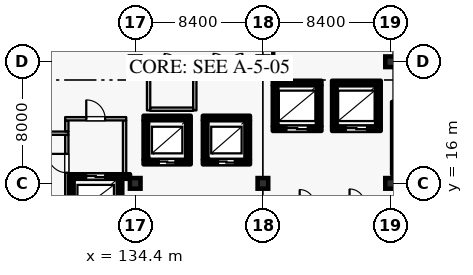
"""IFC4 building model, lengths in metres.
Left out: names, types, materials, properties, quantities, classifications, styles, units other than length and angle.
Written with IfcOpenShell. Run it as: python <this file> out.ifc"""

import sys

from ifc_helpers import new_model, si_unit, direction, frame, frame_2d, origin, origin_2d, place, context, subcontext, project, spatial, rectangle, extrude, element, fill, save


model = new_model("IFC4")
c1 = context("Model", 3, precision=1e-05, world=origin(), true_north=direction((0.0, 1.0)))
c2 = subcontext(c1, "Body", "Model", "MODEL_VIEW")
j1 = project(units=[si_unit("LENGTHUNIT", "METRE"), si_unit("PLANEANGLEUNIT", "RADIAN")], contexts=[c1])
p1 = place(None, origin())
s1 = spatial("IfcSite", under=j1, at=p1, CompositionType="ELEMENT")
p2 = place(p1, origin())
s2 = spatial("IfcBuilding", under=s1, at=p2, CompositionType="ELEMENT")
p3 = place(p2, frame((0.0, 0.0, 28.8)))
s3 = spatial("IfcBuildingStorey", under=s2, at=p3, CompositionType="ELEMENT", Elevation=28.8)
for number, where, z_axis, x_axis in (
    (1, (134.4, 16.0, 0.0), (0.0, 0.0, 1.0), (1.0, 0.0, 0.0)),
    (2, (142.8, 16.0, 0.0), (0.0, 0.0, 1.0), (1.0, 0.0, 0.0)),
    (3, (151.2, 24.0, 0.0), (0.0, 0.0, 1.0), (1.0, 0.0, 0.0)),
    (4, (134.4, 24.0, 0.0), (0.0, 0.0, 1.0), (1.0, 0.0, 0.0)),
    (5, (142.8, 24.0, 0.0), (0.0, 0.0, 1.0), (1.0, 0.0, 0.0)),
    (6, (151.2, 16.0, 0.0), (0.0, 0.0, 1.0), (1.0, 0.0, 0.0)),
):
    element("IfcColumn", number, at=place(p3, frame(where, z_axis=z_axis, x_axis=x_axis)), inside=s3, PredefinedType="COLUMN", context=c2, shape_type="SweptSolid", body=[
        extrude(rectangle(XDim=0.7, YDim=0.7, at=origin_2d()), origin(), (0.0, 0.0, 1.0), 3.6),
    ])
p4 = place(p3, frame((134.95, 17.4, 0.0), z_axis=(0.0, 0.0, 1.0), x_axis=(1.0, 0.0, 0.0)))
e7 = element("IfcWall", 7, at=p4, inside=s3, PredefinedType="SHEAR", context=c2, shape_type="SweptSolid", body=[
    extrude(rectangle(XDim=3.1, YDim=0.3, at=frame_2d((1.55, 0.0))), origin(), (0.0, 0.0, 1.0), 3.365),
])
p5 = place(p4, frame((1.0, 0.0, 0.0)))
e8 = element("IfcOpeningElement", 8, at=p5, cuts=e7, PredefinedType="OPENING", context=c2, shape_type="SweptSolid", body=[
    extrude(rectangle(XDim=1.1, YDim=2.2, at=frame_2d((0.55, 1.1))), frame((0.0, 0.16, 0.0), z_axis=(0.0, -1.0, 0.0), x_axis=(1.0, 0.0, 0.0)), (0.0, 0.0, 1.0), 0.32),
])
p6 = place(p3, frame((137.9, 17.555, 0.0), z_axis=(0.0, 0.0, 1.0), x_axis=(0.0, 1.0, 0.0)))
e9 = element("IfcWall", 9, at=p6, inside=s3, PredefinedType="SHEAR", context=c2, shape_type="SweptSolid", body=[
    extrude(rectangle(XDim=2.59, YDim=0.3, at=frame_2d((1.295, 0.0))), origin(), (0.0, 0.0, 1.0), 3.365),
])
p7 = place(p3, frame((138.05, 20.3, 0.0), z_axis=(0.0, 0.0, 1.0), x_axis=(-1.0, 0.0, 0.0)))
e10 = element("IfcWall", 10, at=p7, inside=s3, PredefinedType="SHEAR", context=c2, shape_type="SweptSolid", body=[
    extrude(rectangle(XDim=3.1, YDim=0.3, at=frame_2d((1.55, 0.0))), origin(), (0.0, 0.0, 1.0), 3.365),
])
p8 = place(p3, frame((135.1, 20.145, 0.0), z_axis=(0.0, 0.0, 1.0), x_axis=(0.0, -1.0, 0.0)))
e11 = element("IfcWall", 11, at=p8, inside=s3, PredefinedType="SHEAR", context=c2, shape_type="SweptSolid", body=[
    extrude(rectangle(XDim=2.59, YDim=0.3, at=frame_2d((1.295, 0.0))), origin(), (0.0, 0.0, 1.0), 3.365),
])
p9 = place(p3, frame((138.85, 17.4, 0.0), z_axis=(0.0, 0.0, 1.0), x_axis=(1.0, 0.0, 0.0)))
e12 = element("IfcWall", 12, at=p9, inside=s3, PredefinedType="SHEAR", context=c2, shape_type="SweptSolid", body=[
    extrude(rectangle(XDim=3.1, YDim=0.3, at=frame_2d((1.55, 0.0))), origin(), (0.0, 0.0, 1.0), 3.365),
])
p10 = place(p9, frame((1.0, 0.0, 0.0)))
e13 = element("IfcOpeningElement", 13, at=p10, cuts=e12, PredefinedType="OPENING", context=c2, shape_type="SweptSolid", body=[
    extrude(rectangle(XDim=1.1, YDim=2.2, at=frame_2d((0.55, 1.1))), frame((0.0, 0.16, 0.0), z_axis=(0.0, -1.0, 0.0), x_axis=(1.0, 0.0, 0.0)), (0.0, 0.0, 1.0), 0.32),
])
p11 = place(p3, frame((141.8, 17.555, 0.0), z_axis=(0.0, 0.0, 1.0), x_axis=(0.0, 1.0, 0.0)))
e14 = element("IfcWall", 14, at=p11, inside=s3, PredefinedType="SHEAR", context=c2, shape_type="SweptSolid", body=[
    extrude(rectangle(XDim=2.59, YDim=0.3, at=frame_2d((1.295, 0.0))), origin(), (0.0, 0.0, 1.0), 3.365),
])
p12 = place(p3, frame((141.95, 20.3, 0.0), z_axis=(0.0, 0.0, 1.0), x_axis=(-1.0, 0.0, 0.0)))
e15 = element("IfcWall", 15, at=p12, inside=s3, PredefinedType="SHEAR", context=c2, shape_type="SweptSolid", body=[
    extrude(rectangle(XDim=3.1, YDim=0.3, at=frame_2d((1.55, 0.0))), origin(), (0.0, 0.0, 1.0), 3.365),
])
p13 = place(p3, frame((139.0, 20.145, 0.0), z_axis=(0.0, 0.0, 1.0), x_axis=(0.0, -1.0, 0.0)))
e16 = element("IfcWall", 16, at=p13, inside=s3, PredefinedType="SHEAR", context=c2, shape_type="SweptSolid", body=[
    extrude(rectangle(XDim=2.59, YDim=0.3, at=frame_2d((1.295, 0.0))), origin(), (0.0, 0.0, 1.0), 3.365),
])
p14 = place(p3, frame((133.4, 13.705, 0.0), z_axis=(0.0, 0.0, 1.0), x_axis=(0.0, 1.0, 0.0)))
e17 = element("IfcWall", 17, at=p14, inside=s3, PredefinedType="SHEAR", context=c2, shape_type="SweptSolid", body=[
    extrude(rectangle(XDim=2.59, YDim=0.3, at=frame_2d((1.295, 0.0))), origin(), (0.0, 0.0, 1.0), 3.365),
])
p15 = place(p3, frame((134.06, 16.45, 0.0), z_axis=(0.0, 0.0, 1.0), x_axis=(-1.0, 0.0, 0.0)))
e18 = element("IfcWall", 18, at=p15, inside=s3, PredefinedType="SHEAR", context=c2, shape_type="SweptSolid", body=[
    extrude(rectangle(XDim=4.01, YDim=0.3, at=frame_2d((2.005, 0.0))), origin(), (0.0, 0.0, 1.0), 3.365),
])
p16 = place(p15, frame((1.635, 0.0, 0.0)))
e19 = element("IfcOpeningElement", 19, at=p16, cuts=e18, PredefinedType="OPENING", context=c2, shape_type="SweptSolid", body=[
    extrude(rectangle(XDim=1.25, YDim=2.25, at=frame_2d((0.625, 1.125))), frame((0.0, 0.16, 0.0), z_axis=(0.0, -1.0, 0.0), x_axis=(1.0, 0.0, 0.0)), (0.0, 0.0, 1.0), 0.32),
])
p17 = place(p3, frame((130.2, 16.295, 0.0), z_axis=(0.0, 0.0, 1.0), x_axis=(0.0, -1.0, 0.0)))
e20 = element("IfcWall", 20, at=p17, inside=s3, PredefinedType="SHEAR", context=c2, shape_type="SweptSolid", body=[
    extrude(rectangle(XDim=2.59, YDim=0.3, at=frame_2d((1.295, 0.0))), origin(), (0.0, 0.0, 1.0), 3.365),
])
p18 = place(p3, frame((143.45, 19.6, 0.0), z_axis=(0.0, 0.0, 1.0), x_axis=(1.0, 0.0, 0.0)))
e21 = element("IfcWall", 21, at=p18, inside=s3, PredefinedType="SHEAR", context=c2, shape_type="SweptSolid", body=[
    extrude(rectangle(XDim=3.2, YDim=0.3, at=frame_2d((1.6, 0.0))), origin(), (0.0, 0.0, 1.0), 3.365),
])
p19 = place(p18, frame((0.9, 0.0, 0.0)))
e22 = element("IfcOpeningElement", 22, at=p19, cuts=e21, PredefinedType="OPENING", context=c2, shape_type="SweptSolid", body=[
    extrude(rectangle(XDim=1.4, YDim=2.35, at=frame_2d((0.7, 1.175))), frame((0.0, 0.16, 0.0), z_axis=(0.0, -1.0, 0.0), x_axis=(1.0, 0.0, 0.0)), (0.0, 0.0, 1.0), 0.32),
])
p20 = place(p3, frame((146.5, 19.755, 0.0), z_axis=(0.0, 0.0, 1.0), x_axis=(0.0, 1.0, 0.0)))
e23 = element("IfcWall", 23, at=p20, inside=s3, PredefinedType="SHEAR", context=c2, shape_type="SweptSolid", body=[
    extrude(rectangle(XDim=2.69, YDim=0.3, at=frame_2d((1.345, 0.0))), origin(), (0.0, 0.0, 1.0), 3.365),
])
p21 = place(p3, frame((146.65, 22.6, 0.0), z_axis=(0.0, 0.0, 1.0), x_axis=(-1.0, 0.0, 0.0)))
e24 = element("IfcWall", 24, at=p21, inside=s3, PredefinedType="SHEAR", context=c2, shape_type="SweptSolid", body=[
    extrude(rectangle(XDim=3.2, YDim=0.3, at=frame_2d((1.6, 0.0))), origin(), (0.0, 0.0, 1.0), 3.365),
])
p22 = place(p3, frame((143.6, 22.445, 0.0), z_axis=(0.0, 0.0, 1.0), x_axis=(0.0, -1.0, 0.0)))
e25 = element("IfcWall", 25, at=p22, inside=s3, PredefinedType="SHEAR", context=c2, shape_type="SweptSolid", body=[
    extrude(rectangle(XDim=2.69, YDim=0.3, at=frame_2d((1.345, 0.0))), origin(), (0.0, 0.0, 1.0), 3.365),
])
p23 = place(p3, frame((147.35, 19.6, 0.0), z_axis=(0.0, 0.0, 1.0), x_axis=(1.0, 0.0, 0.0)))
e26 = element("IfcWall", 26, at=p23, inside=s3, PredefinedType="SHEAR", context=c2, shape_type="SweptSolid", body=[
    extrude(rectangle(XDim=3.2, YDim=0.3, at=frame_2d((1.6, 0.0))), origin(), (0.0, 0.0, 1.0), 3.365),
])
p24 = place(p23, frame((0.9, 0.0, 0.0)))
e27 = element("IfcOpeningElement", 27, at=p24, cuts=e26, PredefinedType="OPENING", context=c2, shape_type="SweptSolid", body=[
    extrude(rectangle(XDim=1.4, YDim=2.35, at=frame_2d((0.7, 1.175))), frame((0.0, 0.16, 0.0), z_axis=(0.0, -1.0, 0.0), x_axis=(1.0, 0.0, 0.0)), (0.0, 0.0, 1.0), 0.32),
])
p25 = place(p3, frame((150.4, 19.755, 0.0), z_axis=(0.0, 0.0, 1.0), x_axis=(0.0, 1.0, 0.0)))
e28 = element("IfcWall", 28, at=p25, inside=s3, PredefinedType="SHEAR", context=c2, shape_type="SweptSolid", body=[
    extrude(rectangle(XDim=2.69, YDim=0.3, at=frame_2d((1.345, 0.0))), origin(), (0.0, 0.0, 1.0), 3.365),
])
p26 = place(p3, frame((150.55, 22.6, 0.0), z_axis=(0.0, 0.0, 1.0), x_axis=(-1.0, 0.0, 0.0)))
e29 = element("IfcWall", 29, at=p26, inside=s3, PredefinedType="SHEAR", context=c2, shape_type="SweptSolid", body=[
    extrude(rectangle(XDim=3.2, YDim=0.3, at=frame_2d((1.6, 0.0))), origin(), (0.0, 0.0, 1.0), 3.365),
])
p27 = place(p3, frame((147.5, 22.445, 0.0), z_axis=(0.0, 0.0, 1.0), x_axis=(0.0, -1.0, 0.0)))
e30 = element("IfcWall", 30, at=p27, inside=s3, PredefinedType="SHEAR", context=c2, shape_type="SweptSolid", body=[
    extrude(rectangle(XDim=2.69, YDim=0.3, at=frame_2d((1.345, 0.0))), origin(), (0.0, 0.0, 1.0), 3.365),
])
p28 = place(p3, frame((126.19, 19.3, 0.0), z_axis=(0.0, 0.0, 1.0), x_axis=(1.0, 0.0, 0.0)))
e31 = element("IfcWall", 31, at=p28, inside=s3, PredefinedType="PARTITIONING", context=c2, shape_type="SweptSolid", body=[
    extrude(rectangle(XDim=3.82, YDim=0.22, at=frame_2d((1.91, 0.0))), origin(), (0.0, 0.0, 1.0), 3.365),
])
p29 = place(p28, frame((1.35, 0.0, 0.0)))
e32 = element("IfcOpeningElement", 32, at=p29, cuts=e31, PredefinedType="OPENING", context=c2, shape_type="SweptSolid", body=[
    extrude(rectangle(XDim=1.12, YDim=2.2, at=frame_2d((0.56, 1.1))), frame((0.0, 0.12, 0.0), z_axis=(0.0, -1.0, 0.0), x_axis=(1.0, 0.0, 0.0)), (0.0, 0.0, 1.0), 0.24),
])
p30 = place(p3, frame((129.9, 13.365, 0.0), z_axis=(0.0, 0.0, 1.0), x_axis=(0.0, 1.0, 0.0)))
e33 = element("IfcWall", 33, at=p30, inside=s3, PredefinedType="PARTITIONING", context=c2, shape_type="SweptSolid", body=[
    extrude(rectangle(XDim=5.82, YDim=0.22, at=frame_2d((2.91, 0.0))), origin(), (0.0, 0.0, 1.0), 3.365),
])
p31 = place(p30, frame((3.335, 0.0, 0.0)))
e34 = element("IfcOpeningElement", 34, at=p31, cuts=e33, PredefinedType="OPENING", context=c2, shape_type="SweptSolid", body=[
    extrude(rectangle(XDim=1.24, YDim=2.2, at=frame_2d((0.62, 1.1))), frame((0.0, 0.12, 0.0), z_axis=(0.0, -1.0, 0.0), x_axis=(1.0, 0.0, 0.0)), (0.0, 0.0, 1.0), 0.24),
])
p32 = place(p3, frame((129.9, 19.415, 0.0), z_axis=(0.0, 0.0, 1.0), x_axis=(0.0, 1.0, 0.0)))
e35 = element("IfcWall", 35, at=p32, inside=s3, PredefinedType="PARTITIONING", context=c2, shape_type="SweptSolid", body=[
    extrude(rectangle(XDim=0.72, YDim=0.22, at=frame_2d((0.36, 0.0))), origin(), (0.0, 0.0, 1.0), 3.365),
])
p33 = place(p3, frame((133.7, 16.605, 0.0), z_axis=(0.0, 0.0, 1.0), x_axis=(0.0, 1.0, 0.0)))
e36 = element("IfcWall", 36, at=p33, inside=s3, PredefinedType="PARTITIONING", context=c2, shape_type="SweptSolid", body=[
    extrude(rectangle(XDim=3.53, YDim=0.22, at=frame_2d((1.765, 0.0))), origin(), (0.0, 0.0, 1.0), 3.365),
])
p34 = place(p3, frame((129.79, 20.25, 0.0), z_axis=(0.0, 0.0, 1.0), x_axis=(1.0, 0.0, 0.0)))
e37 = element("IfcWall", 37, at=p34, inside=s3, PredefinedType="PARTITIONING", context=c2, shape_type="SweptSolid", body=[
    extrude(rectangle(XDim=4.02, YDim=0.22, at=frame_2d((2.01, 0.0))), origin(), (0.0, 0.0, 1.0), 3.365),
])
p35 = place(p34, frame((1.39, 0.0, 0.0)))
e38 = element("IfcOpeningElement", 38, at=p35, cuts=e37, PredefinedType="OPENING", context=c2, shape_type="SweptSolid", body=[
    extrude(rectangle(XDim=1.24, YDim=2.2, at=frame_2d((0.62, 1.1))), frame((0.0, 0.12, 0.0), z_axis=(0.0, -1.0, 0.0), x_axis=(1.0, 0.0, 0.0)), (0.0, 0.0, 1.0), 0.24),
])
p36 = place(p3, frame((151.3, 16.8, 0.0), z_axis=(0.0, 0.0, 1.0), x_axis=(1.0, 0.0, 0.0)))
e39 = element("IfcWall", 39, at=p36, inside=s3, PredefinedType="SHEAR", context=c2, shape_type="SweptSolid", body=[
    extrude(rectangle(XDim=8.2, YDim=0.4, at=frame_2d((4.1, 0.0))), origin(), (0.0, 0.0, 1.0), 3.365),
])
p37 = place(p3, frame((151.3, 21.16, 0.0), z_axis=(0.0, 0.0, 1.0), x_axis=(1.0, 0.0, 0.0)))
e40 = element("IfcWall", 40, at=p37, inside=s3, PredefinedType="SHEAR", context=c2, shape_type="SweptSolid", body=[
    extrude(rectangle(XDim=8.2, YDim=0.4, at=frame_2d((4.1, 0.0))), origin(), (0.0, 0.0, 1.0), 3.365),
])
p38 = place(p37, frame((0.43, 0.0, 0.0)))
e41 = element("IfcOpeningElement", 41, at=p38, cuts=e40, PredefinedType="OPENING", context=c2, shape_type="SweptSolid", body=[
    extrude(rectangle(XDim=1.16, YDim=2.2, at=frame_2d((0.58, 1.1))), frame((0.0, 0.21, 0.0), z_axis=(0.0, -1.0, 0.0), x_axis=(1.0, 0.0, 0.0)), (0.0, 0.0, 1.0), 0.42),
])
p39 = place(p3, frame((151.5, 17.005, 0.0), z_axis=(0.0, 0.0, 1.0), x_axis=(0.0, 1.0, 0.0)))
e42 = element("IfcWall", 42, at=p39, inside=s3, PredefinedType="SHEAR", context=c2, shape_type="SweptSolid", body=[
    extrude(rectangle(XDim=3.95, YDim=0.4, at=frame_2d((1.975, 0.0))), origin(), (0.0, 0.0, 1.0), 3.365),
])
p40 = place(p3, frame((151.5, 21.365, 0.0), z_axis=(0.0, 0.0, 1.0), x_axis=(0.0, 1.0, 0.0)))
e43 = element("IfcWall", 43, at=p40, inside=s3, PredefinedType="PARTITIONING", context=c2, shape_type="SweptSolid", body=[
    extrude(rectangle(XDim=5.82, YDim=0.22, at=frame_2d((2.91, 0.0))), origin(), (0.0, 0.0, 1.0), 3.365),
])
p41 = place(p3, frame((138.96, 23.6, 0.0), z_axis=(0.0, 0.0, 1.0), x_axis=(1.0, 0.0, 0.0)))
e44 = element("IfcWall", 44, at=p41, inside=s3, PredefinedType="PARTITIONING", context=c2, shape_type="SweptSolid", body=[
    extrude(rectangle(XDim=3.08, YDim=0.14, at=frame_2d((1.54, 0.0))), origin(), (0.0, 0.0, 1.0), 3.365),
])
p42 = place(p41, frame((0.59, 0.0, 0.0)))
e45 = element("IfcOpeningElement", 45, at=p42, cuts=e44, PredefinedType="OPENING", context=c2, shape_type="SweptSolid", body=[
    extrude(rectangle(XDim=1.9, YDim=2.4, at=frame_2d((0.95, 1.2))), frame((0.0, 0.08, 0.0), z_axis=(0.0, -1.0, 0.0), x_axis=(1.0, 0.0, 0.0)), (0.0, 0.0, 1.0), 0.16),
])
p43 = place(p3, frame((135.36, 23.6, 0.0), z_axis=(0.0, 0.0, 1.0), x_axis=(1.0, 0.0, 0.0)))
e46 = element("IfcWall", 46, at=p43, inside=s3, PredefinedType="PARTITIONING", context=c2, shape_type="SweptSolid", body=[
    extrude(rectangle(XDim=2.88, YDim=0.22, at=frame_2d((1.44, 0.0))), origin(), (0.0, 0.0, 1.0), 3.365),
])
p44 = place(p43, frame((0.97, 0.0, 0.0)))
e47 = element("IfcOpeningElement", 47, at=p44, cuts=e46, PredefinedType="OPENING", context=c2, shape_type="SweptSolid", body=[
    extrude(rectangle(XDim=0.94, YDim=2.15, at=frame_2d((0.47, 1.075))), frame((0.0, 0.12, 0.0), z_axis=(0.0, -1.0, 0.0), x_axis=(1.0, 0.0, 0.0)), (0.0, 0.0, 1.0), 0.24),
])
p45 = place(p3, frame((143.48, 23.45, 0.0), z_axis=(0.0, 0.0, 1.0), x_axis=(0.0, 1.0, 0.0)))
e48 = element("IfcWall", 48, at=p45, inside=s3, PredefinedType="PARTITIONING", context=c2, shape_type="SweptSolid", body=[
    extrude(rectangle(XDim=3.21, YDim=0.14, at=frame_2d((1.605, 0.0))), origin(), (0.0, 0.0, 1.0), 3.365),
])
for number, where, z_axis, x_axis in (
    (49, (135.28, 20.8, 0.0), (0.0, 0.0, 1.0), (0.0, 1.0, 0.0)),
    (50, (138.32, 20.8, 0.0), (0.0, 0.0, 1.0), (0.0, 1.0, 0.0)),
):
    element("IfcWall", number, at=place(p3, frame(where, z_axis=z_axis, x_axis=x_axis)), inside=s3, PredefinedType="PARTITIONING", context=c2, shape_type="SweptSolid", body=[
        extrude(rectangle(XDim=2.748, YDim=0.22, at=frame_2d((1.374, 0.0))), origin(), (0.0, 0.0, 1.0), 3.365),
    ])
p46 = place(p3, frame((135.39, 20.88, 0.0), z_axis=(0.0, 0.0, 1.0), x_axis=(1.0, 0.0, 0.0)))
e51 = element("IfcWall", 51, at=p46, inside=s3, PredefinedType="PARTITIONING", context=c2, shape_type="SweptSolid", body=[
    extrude(rectangle(XDim=2.82, YDim=0.22, at=frame_2d((1.41, 0.0))), origin(), (0.0, 0.0, 1.0), 3.365),
])
p47 = place(p5, origin())
e52 = element("IfcDoor", 52, at=p47, inside=s3, OperationType="DOUBLE_DOOR_SLIDING", PredefinedType="DOOR", context=c2, shape_type="SweptSolid", body=[
    extrude(rectangle(XDim=1.1, YDim=2.2, at=frame_2d((0.55, 1.1))), frame((0.0, 0.025, 0.0), z_axis=(0.0, -1.0, 0.0), x_axis=(1.0, 0.0, 0.0)), (0.0, 0.0, 1.0), 0.05),
])
fill(e8, e52)
p48 = place(p10, origin())
e53 = element("IfcDoor", 53, at=p48, inside=s3, OperationType="DOUBLE_DOOR_SLIDING", PredefinedType="DOOR", context=c2, shape_type="SweptSolid", body=[
    extrude(rectangle(XDim=1.1, YDim=2.2, at=frame_2d((0.55, 1.1))), frame((0.0, 0.025, 0.0), z_axis=(0.0, -1.0, 0.0), x_axis=(1.0, 0.0, 0.0)), (0.0, 0.0, 1.0), 0.05),
])
fill(e13, e53)
p49 = place(p16, origin())
e54 = element("IfcDoor", 54, at=p49, inside=s3, OperationType="DOUBLE_DOOR_SLIDING", PredefinedType="DOOR", context=c2, shape_type="SweptSolid", body=[
    extrude(rectangle(XDim=1.25, YDim=2.25, at=frame_2d((0.625, 1.125))), frame((0.0, 0.025, 0.0), z_axis=(0.0, -1.0, 0.0), x_axis=(1.0, 0.0, 0.0)), (0.0, 0.0, 1.0), 0.05),
])
fill(e19, e54)
p50 = place(p19, origin())
e55 = element("IfcDoor", 55, at=p50, inside=s3, OperationType="DOUBLE_DOOR_SLIDING", PredefinedType="DOOR", context=c2, shape_type="SweptSolid", body=[
    extrude(rectangle(XDim=1.4, YDim=2.35, at=frame_2d((0.7, 1.175))), frame((0.0, 0.025, 0.0), z_axis=(0.0, -1.0, 0.0), x_axis=(1.0, 0.0, 0.0)), (0.0, 0.0, 1.0), 0.05),
])
fill(e22, e55)
p51 = place(p24, origin())
e56 = element("IfcDoor", 56, at=p51, inside=s3, OperationType="DOUBLE_DOOR_SLIDING", PredefinedType="DOOR", context=c2, shape_type="SweptSolid", body=[
    extrude(rectangle(XDim=1.4, YDim=2.35, at=frame_2d((0.7, 1.175))), frame((0.0, 0.025, 0.0), z_axis=(0.0, -1.0, 0.0), x_axis=(1.0, 0.0, 0.0)), (0.0, 0.0, 1.0), 0.05),
])
fill(e27, e56)
p52 = place(p31, origin())
e57 = element("IfcDoor", 57, at=p52, inside=s3, OperationType="SINGLE_SWING_RIGHT", PredefinedType="DOOR", context=c2, shape_type="SweptSolid", body=[
    extrude(rectangle(XDim=1.24, YDim=2.2, at=frame_2d((0.62, 1.1))), frame((0.0, 0.025, 0.0), z_axis=(0.0, -1.0, 0.0), x_axis=(1.0, 0.0, 0.0)), (0.0, 0.0, 1.0), 0.05),
])
fill(e34, e57)
p53 = place(p35, origin())
e58 = element("IfcDoor", 58, at=p53, inside=s3, OperationType="SINGLE_SWING_LEFT", PredefinedType="DOOR", context=c2, shape_type="SweptSolid", body=[
    extrude(rectangle(XDim=1.24, YDim=2.2, at=frame_2d((0.62, 1.1))), frame((0.0, 0.025, 0.0), z_axis=(0.0, -1.0, 0.0), x_axis=(1.0, 0.0, 0.0)), (0.0, 0.0, 1.0), 0.05),
])
fill(e38, e58)
p54 = place(p42, origin())
e59 = element("IfcDoor", 59, at=p54, inside=s3, OperationType="DOUBLE_DOOR_SINGLE_SWING", PredefinedType="DOOR", context=c2, shape_type="SweptSolid", body=[
    extrude(rectangle(XDim=1.9, YDim=2.4, at=frame_2d((0.95, 1.2))), frame((0.0, 0.025, 0.0), z_axis=(0.0, -1.0, 0.0), x_axis=(1.0, 0.0, 0.0)), (0.0, 0.0, 1.0), 0.05),
])
fill(e45, e59)
p55 = place(p44, origin())
e60 = element("IfcDoor", 60, at=p55, inside=s3, OperationType="SINGLE_SWING_LEFT", PredefinedType="DOOR", context=c2, shape_type="SweptSolid", body=[
    extrude(rectangle(XDim=0.94, YDim=2.15, at=frame_2d((0.47, 1.075))), frame((0.0, 0.025, 0.0), z_axis=(0.0, -1.0, 0.0), x_axis=(1.0, 0.0, 0.0)), (0.0, 0.0, 1.0), 0.05),
])
fill(e47, e60)
save(model, sys.argv[1])
